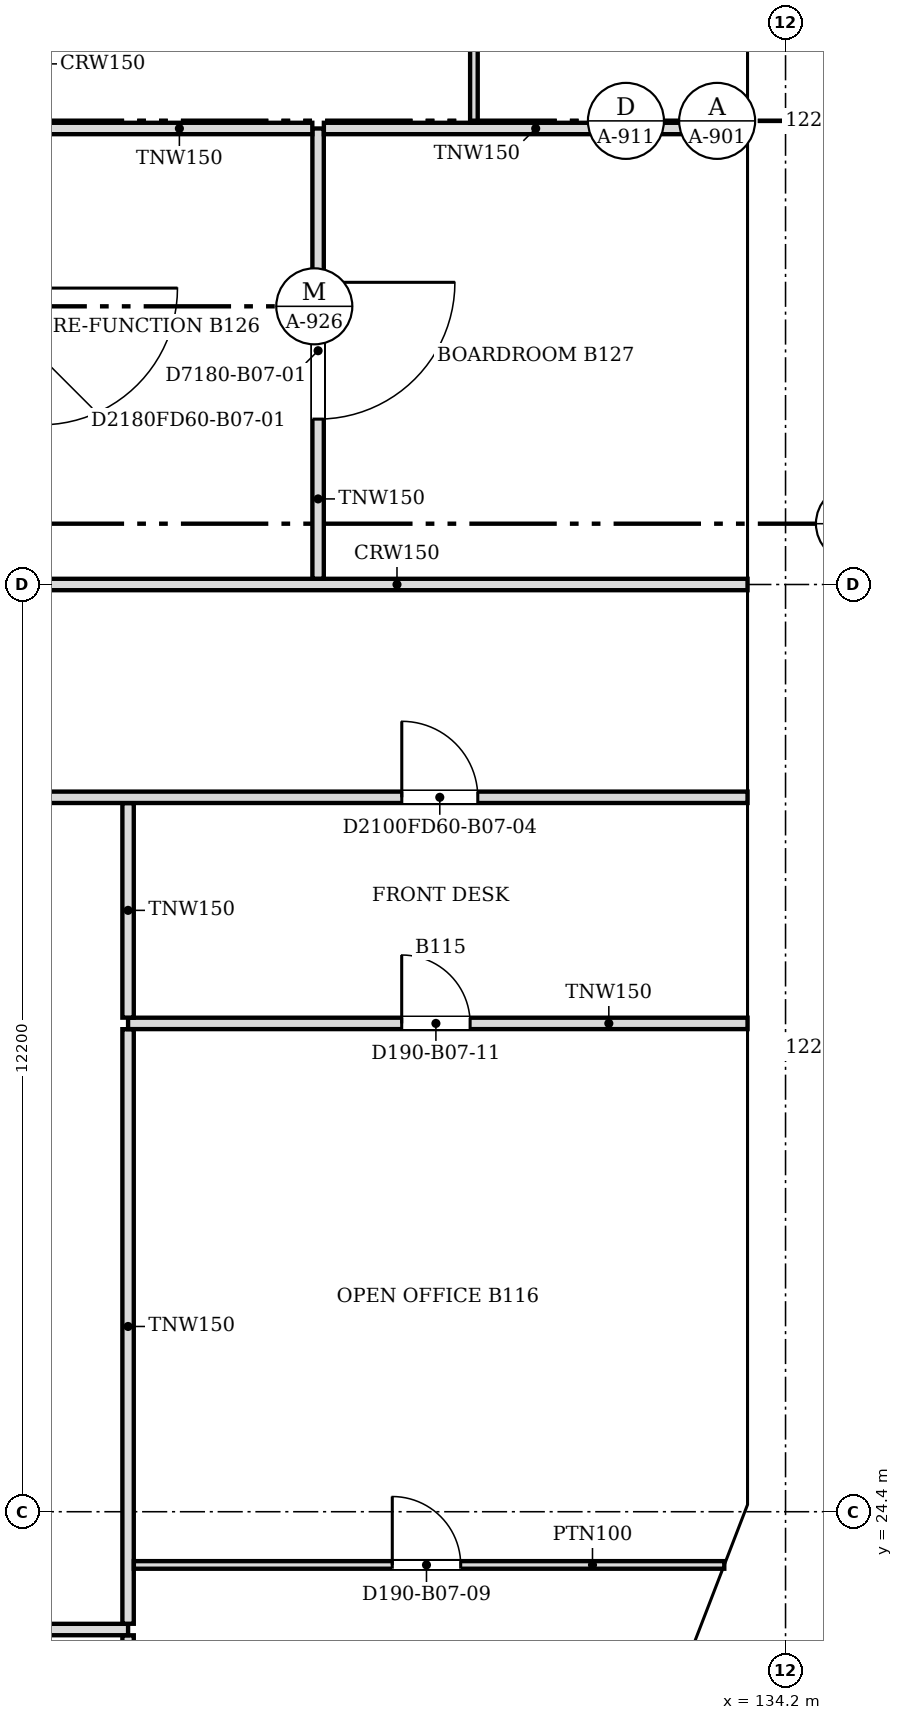
"""IFC4 building model, lengths in metres.
Left out: names, types, materials, properties, quantities, classifications, styles, units other than length and angle.
Written with IfcOpenShell. Run it as: python <this file> out.ifc"""

import sys

from ifc_helpers import new_model, si_unit, direction, frame, frame_2d, origin, place, context, subcontext, project, spatial, polyline, rectangle, outline, extrude, faceted_brep, source, transform, mapped, element, fill, save


model = new_model("IFC4")
c1 = context("Model", 3, precision=1e-05, world=origin(), true_north=direction((0.0, 1.0)))
c2 = subcontext(c1, "Body", "Model", "MODEL_VIEW")
j1 = project(units=[si_unit("LENGTHUNIT", "METRE"), si_unit("PLANEANGLEUNIT", "RADIAN")], contexts=[c1])
p1 = place(None, origin())
s1 = spatial("IfcSite", under=j1, at=p1, CompositionType="ELEMENT")
p2 = place(p1, origin())
s2 = spatial("IfcBuilding", under=s1, at=p2, CompositionType="ELEMENT")
p3 = place(p2, frame((0.0, 0.0, 72.4)))
s3 = spatial("IfcBuildingStorey", under=s2, at=p3, CompositionType="ELEMENT", Elevation=72.4)
m1 = source(origin(), c2, "Body", "Brep", [
    faceted_brep([(2.95, -0.25, 0.0), (2.997, -0.25, 0.059), (2.997, -0.25, 7.541), (2.95, -0.25, 7.6), (0.0, -0.25, 3.8), (0.053, 0.25, 3.868), (2.904, 0.25, 7.54), (2.904, 0.25, 0.06), (0.053, 0.25, 3.732), (2.95, 0.0, 0.0), (2.95, 0.0, 7.6), (0.0, 0.0, 3.8)], [[[0, 1, 2, 3, 4]], [[5, 6, 7, 8]], [[1, 0, 9]], [[10, 3, 2]], [[6, 5, 11, 4, 3, 10]], [[8, 7, 9, 0, 4, 11]], [[8, 11, 5]], [[1, 9, 7, 6, 10, 2]]]),
])
p4 = place(p3, frame((132.888, 21.694, -3.8), z_axis=(0.0, 0.0, 1.0), x_axis=(0.359901446078, 0.932990326376, 0.0)))
e1 = element("IfcWall", 1, at=p4, inside=s3, PredefinedType="SOLIDWALL", context=c2, shape_type="MappedRepresentation", body=[
    mapped(m1, transform((0.0, 0.0, 0.0), scale=1.0)),
])
m2 = source(origin(), c2, "Body", "SweptSolid", [
    extrude(outline(polyline([(2.75, 6.935), (0.316, 3.8), (2.75, 0.665), (2.75, 6.935)])), frame((0.0, 0.26, 0.0), z_axis=(0.0, -1.0, 0.0), x_axis=(1.0, 0.0, 0.0)), (0.0, 0.0, 1.0), 0.52),
])
p5 = place(p4, origin())
e2 = element("IfcOpeningElement", 2, at=p5, cuts=e1, PredefinedType="OPENING", context=c2, shape_type="MappedRepresentation", body=[
    mapped(m2, transform((0.0, 0.0, 0.0), scale=1.0)),
])
m3 = source(origin(), c2, "Body", "Brep", [
    faceted_brep([(0.047, -0.25, 0.0), (3.05, -0.25, 3.8), (0.047, -0.25, 7.6), (0.0, -0.25, 7.54), (0.0, -0.25, 0.06), (0.093, 0.25, 7.541), (3.05, 0.25, 3.8), (0.093, 0.25, 0.059), (0.047, 0.0, 0.0), (0.047, 0.0, 7.6)], [[[0, 1, 2, 3, 4]], [[5, 6, 7]], [[7, 6, 1, 0, 8]], [[6, 5, 9, 2, 1]], [[3, 2, 9]], [[8, 0, 4]], [[7, 8, 4, 3, 9, 5]]]),
])
p6 = place(p3, frame((133.95, 24.4, -3.8), z_axis=(0.0, 0.0, 1.0), x_axis=(0.0, 1.0, 0.0)))
e3 = element("IfcWall", 3, at=p6, inside=s3, PredefinedType="SOLIDWALL", context=c2, shape_type="MappedRepresentation", body=[
    mapped(m3, transform((0.0, 0.0, 0.0), scale=1.0)),
])
m4 = source(origin(), c2, "Body", "SweptSolid", [
    extrude(outline(polyline([(0.247, 0.656), (2.731, 3.8), (0.247, 6.944), (0.247, 0.656)])), frame((0.0, 0.26, 0.0), z_axis=(0.0, -1.0, 0.0), x_axis=(1.0, 0.0, 0.0)), (0.0, 0.0, 1.0), 0.52),
])
p7 = place(p6, origin())
e4 = element("IfcOpeningElement", 4, at=p7, cuts=e3, PredefinedType="OPENING", context=c2, shape_type="MappedRepresentation", body=[
    mapped(m4, transform((0.0, 0.0, 0.0), scale=1.0)),
])
m5 = source(origin(), c2, "Body", "SweptSolid", [
    extrude(outline(polyline([(3.05, 0.0), (6.1, 3.8), (3.05, 7.6), (0.0, 3.8), (3.05, 0.0)])), frame((0.0, 0.25, 0.0), z_axis=(0.0, -1.0, 0.0), x_axis=(1.0, 0.0, 0.0)), (0.0, 0.0, 1.0), 0.5),
])
p8 = place(p3, frame((133.95, 27.45, -3.8), z_axis=(0.0, 0.0, 1.0), x_axis=(0.0, 1.0, 0.0)))
e5 = element("IfcWall", 5, at=p8, inside=s3, PredefinedType="SOLIDWALL", context=c2, shape_type="MappedRepresentation", body=[
    mapped(m5, transform((0.0, 0.0, 0.0), scale=1.0)),
])
m6 = source(origin(), c2, "Body", "SweptSolid", [
    extrude(outline(polyline([(3.05, 0.399), (5.78, 3.8), (3.05, 7.2), (0.321, 3.8), (3.05, 0.399)])), frame((0.0, 0.26, 0.0), z_axis=(0.0, -1.0, 0.0), x_axis=(1.0, 0.0, 0.0)), (0.0, 0.0, 1.0), 0.52),
])
p9 = place(p8, origin())
e6 = element("IfcOpeningElement", 6, at=p9, cuts=e5, PredefinedType="OPENING", context=c2, shape_type="MappedRepresentation", body=[
    mapped(m6, transform((0.0, 0.0, 0.0), scale=1.0)),
])
m7 = source(origin(), c2, "Body", "Brep", [
    faceted_brep([(3.05, -0.25, 0.0), (6.1, -0.25, 3.8), (6.1, -0.25, 3.8), (3.05, -0.25, 7.6), (0.0, -0.25, 3.8), (0.0, 0.25, 3.8), (3.05, 0.25, 7.6), (6.1, 0.25, 3.8), (6.1, 0.25, 3.8), (3.05, 0.25, 0.0)], [[[0, 1, 2, 3, 4]], [[5, 6, 7, 8, 9]], [[9, 8, 1, 0]], [[7, 6, 3, 2]], [[6, 5, 4, 3]], [[5, 9, 0, 4]], [[1, 8, 7, 2]]]),
])
p10 = place(p3, frame((133.95, 33.55, -3.8), z_axis=(0.0, 0.0, 1.0), x_axis=(0.0, 1.0, 0.0)))
e7 = element("IfcWall", 7, at=p10, inside=s3, PredefinedType="SOLIDWALL", context=c2, shape_type="MappedRepresentation", body=[
    mapped(m7, transform((0.0, 0.0, 0.0), scale=1.0)),
])
p11 = place(p10, origin())
e8 = element("IfcOpeningElement", 8, at=p11, cuts=e7, PredefinedType="OPENING", context=c2, shape_type="MappedRepresentation", body=[
    mapped(m6, transform((0.0, 0.0, 0.0), scale=1.0)),
])
p12 = place(p3, frame((133.95, 39.65, -3.8), z_axis=(0.0, 0.0, 1.0), x_axis=(0.0, 1.0, 0.0)))
e9 = element("IfcWall", 9, at=p12, inside=s3, PredefinedType="SOLIDWALL", context=c2, shape_type="MappedRepresentation", body=[
    mapped(m5, transform((0.0, 0.0, 0.0), scale=1.0)),
])
p13 = place(p12, origin())
e10 = element("IfcOpeningElement", 10, at=p13, cuts=e9, PredefinedType="OPENING", context=c2, shape_type="MappedRepresentation", body=[
    mapped(m6, transform((0.0, 0.0, 0.0), scale=1.0)),
])
p14 = place(p2, frame((0.0, 0.0, 76.2)))
s4 = spatial("IfcBuildingStorey", under=s2, at=p14, CompositionType="ELEMENT", Elevation=76.2)
m8 = source(origin(), c2, "Body", "Brep", [
    faceted_brep([(0.053, -0.25, 0.0), (3.003, -0.25, 3.8), (0.053, -0.25, 7.6), (0.0, -0.25, 7.532), (0.0, -0.25, 0.068), (0.106, 0.25, 7.532), (2.957, 0.25, 3.86), (2.957, 0.25, 3.74), (0.106, 0.25, 0.068), (3.003, 0.0, 3.8), (0.053, 0.0, 0.0), (0.053, 0.0, 7.6)], [[[0, 1, 2, 3, 4]], [[5, 6, 7, 8]], [[8, 7, 9, 1, 0, 10]], [[6, 5, 11, 2, 1, 9]], [[3, 2, 11]], [[10, 0, 4]], [[8, 10, 4, 3, 11, 5]], [[9, 7, 6]]]),
])
p15 = place(p14, frame((132.869, 21.644, -3.8), z_axis=(0.0, 0.0, 1.0), x_axis=(0.359855894603, 0.933007896601, 0.0)))
e11 = element("IfcWall", 11, at=p15, inside=s4, PredefinedType="SOLIDWALL", context=c2, shape_type="MappedRepresentation", body=[
    mapped(m8, transform((0.0, 0.0, 0.0), scale=1.0)),
])
m9 = source(origin(), c2, "Body", "SweptSolid", [
    extrude(outline(polyline([(0.253, 0.665), (2.687, 3.8), (0.253, 6.935), (0.253, 0.665)])), frame((0.0, 0.26, 0.0), z_axis=(0.0, -1.0, 0.0), x_axis=(1.0, 0.0, 0.0)), (0.0, 0.0, 1.0), 0.52),
])
p16 = place(p15, origin())
e12 = element("IfcOpeningElement", 12, at=p16, cuts=e11, PredefinedType="OPENING", context=c2, shape_type="MappedRepresentation", body=[
    mapped(m9, transform((0.0, 0.0, 0.0), scale=1.0)),
])
m10 = source(origin(), c2, "Body", "Brep", [
    faceted_brep([(3.003, -0.25, 0.0), (6.053, -0.25, 3.8), (3.003, -0.25, 7.6), (0.0, -0.25, 3.8), (0.047, 0.25, 3.859), (3.003, 0.25, 7.6), (6.053, 0.25, 3.8), (3.003, 0.25, 0.0), (0.047, 0.25, 3.741), (0.0, 0.0, 3.8)], [[[0, 1, 2, 3]], [[4, 5, 6, 7, 8]], [[7, 6, 1, 0]], [[6, 5, 2, 1]], [[5, 4, 9, 3, 2]], [[8, 7, 0, 3, 9]], [[8, 9, 4]]]),
])
p17 = place(p14, frame((133.95, 24.447, -3.8), z_axis=(0.0, 0.0, 1.0), x_axis=(0.0, 1.0, 0.0)))
e13 = element("IfcWall", 13, at=p17, inside=s4, PredefinedType="SOLIDWALL", context=c2, shape_type="MappedRepresentation", body=[
    mapped(m10, transform((0.0, 0.0, 0.0), scale=1.0)),
])
m11 = source(origin(), c2, "Body", "SweptSolid", [
    extrude(outline(polyline([(3.005, 0.401), (5.733, 3.8), (3.005, 7.199), (0.319, 3.8), (3.005, 0.401)])), frame((0.0, 0.26, 0.0), z_axis=(0.0, -1.0, 0.0), x_axis=(1.0, 0.0, 0.0)), (0.0, 0.0, 1.0), 0.52),
])
p18 = place(p17, origin())
e14 = element("IfcOpeningElement", 14, at=p18, cuts=e13, PredefinedType="OPENING", context=c2, shape_type="MappedRepresentation", body=[
    mapped(m11, transform((0.0, 0.0, 0.0), scale=1.0)),
])
m12 = source(origin(), c2, "Body", "SweptSolid", [
    extrude(outline(polyline([(3.05, 0.0), (6.1, 3.8), (3.05, 7.6), (0.0, 3.8), (3.05, 0.0)])), frame((0.0, 0.25, 0.0), z_axis=(0.0, -1.0, 0.0), x_axis=(1.0, 0.0, 0.0)), (0.0, 0.0, 1.0), 0.5),
])
p19 = place(p14, frame((133.95, 30.5, -3.8), z_axis=(0.0, 0.0, 1.0), x_axis=(0.0, 1.0, 0.0)))
e15 = element("IfcWall", 15, at=p19, inside=s4, PredefinedType="SOLIDWALL", context=c2, shape_type="MappedRepresentation", body=[
    mapped(m12, transform((0.0, 0.0, 0.0), scale=1.0)),
])
m13 = source(origin(), c2, "Body", "SweptSolid", [
    extrude(outline(polyline([(3.05, 0.399), (5.78, 3.8), (3.05, 7.201), (0.321, 3.8), (3.05, 0.399)])), frame((0.0, 0.26, 0.0), z_axis=(0.0, -1.0, 0.0), x_axis=(1.0, 0.0, 0.0)), (0.0, 0.0, 1.0), 0.52),
])
p20 = place(p19, origin())
e16 = element("IfcOpeningElement", 16, at=p20, cuts=e15, PredefinedType="OPENING", context=c2, shape_type="MappedRepresentation", body=[
    mapped(m13, transform((0.0, 0.0, 0.0), scale=1.0)),
])
m14 = source(origin(), c2, "Body", "Brep", [
    faceted_brep([(3.05, -0.25, 0.0), (6.1, -0.25, 3.8), (6.1, -0.25, 3.8), (3.05, -0.25, 7.6), (0.0, -0.25, 3.8), (0.0, 0.25, 3.8), (3.05, 0.25, 7.6), (6.1, 0.25, 3.8), (6.1, 0.25, 3.8), (3.05, 0.25, 0.0)], [[[0, 1, 2, 3, 4]], [[5, 6, 7, 8, 9]], [[9, 8, 1, 0]], [[7, 6, 3, 2]], [[6, 5, 4, 3]], [[5, 9, 0, 4]], [[1, 8, 7, 2]]]),
])
p21 = place(p14, frame((133.95, 36.6, -3.8), z_axis=(0.0, 0.0, 1.0), x_axis=(0.0, 1.0, 0.0)))
e17 = element("IfcWall", 17, at=p21, inside=s4, PredefinedType="SOLIDWALL", context=c2, shape_type="MappedRepresentation", body=[
    mapped(m14, transform((0.0, 0.0, 0.0), scale=1.0)),
])
p22 = place(p21, origin())
e18 = element("IfcOpeningElement", 18, at=p22, cuts=e17, PredefinedType="OPENING", context=c2, shape_type="MappedRepresentation", body=[
    mapped(m13, transform((0.0, 0.0, 0.0), scale=1.0)),
])
m15 = source(origin(), c2, "Body", "Brep", [
    faceted_brep([(3.05, -0.25, 0.0), (6.053, -0.25, 3.8), (3.05, -0.25, 7.6), (0.0, -0.25, 3.8), (0.0, 0.25, 3.8), (3.05, 0.25, 7.6), (6.007, 0.25, 3.859), (6.007, 0.25, 3.741), (3.05, 0.25, 0.0), (6.053, 0.0, 3.8)], [[[0, 1, 2, 3]], [[4, 5, 6, 7, 8]], [[8, 7, 9, 1, 0]], [[6, 5, 2, 1, 9]], [[5, 4, 3, 2]], [[4, 8, 0, 3]], [[9, 7, 6]]]),
])
p23 = place(p14, frame((133.95, 42.7, -3.8), z_axis=(0.0, 0.0, 1.0), x_axis=(0.0, 1.0, 0.0)))
e19 = element("IfcWall", 19, at=p23, inside=s4, PredefinedType="SOLIDWALL", context=c2, shape_type="MappedRepresentation", body=[
    mapped(m15, transform((0.0, 0.0, 0.0), scale=1.0)),
])
m16 = source(origin(), c2, "Body", "SweptSolid", [
    extrude(outline(polyline([(3.049, 0.401), (5.735, 3.8), (3.049, 7.199), (0.321, 3.8), (3.049, 0.401)])), frame((0.0, 0.26, 0.0), z_axis=(0.0, -1.0, 0.0), x_axis=(1.0, 0.0, 0.0)), (0.0, 0.0, 1.0), 0.52),
])
p24 = place(p23, origin())
e20 = element("IfcOpeningElement", 20, at=p24, cuts=e19, PredefinedType="OPENING", context=c2, shape_type="MappedRepresentation", body=[
    mapped(m16, transform((0.0, 0.0, 0.0), scale=1.0)),
])
p25 = place(p3, frame((125.55, 18.8, 0.0), z_axis=(0.0, 0.0, 1.0), x_axis=(0.0, 1.0, 0.0)))
e21 = element("IfcWall", 21, at=p25, inside=s3, PredefinedType="PARTITIONING", context=c2, shape_type="SweptSolid", body=[
    extrude(rectangle(XDim=3.974, YDim=0.15, at=frame_2d((1.987, 0.0))), origin(), (0.0, 0.0, 1.0), 3.067),
])
p26 = place(p3, frame((125.55, 22.85, 0.0), z_axis=(0.0, 0.0, 1.0), x_axis=(-1.0, 0.0, 0.0)))
e22 = element("IfcWall", 22, at=p26, inside=s3, PredefinedType="PARTITIONING", context=c2, shape_type="SweptSolid", body=[
    extrude(rectangle(XDim=9.15, YDim=0.15, at=frame_2d((4.575, 0.0))), origin(), (0.0, 0.0, 1.0), 3.067),
])
m17 = source(origin(), c2, "Body", "SweptSolid", [
    extrude(rectangle(XDim=0.9, YDim=2.1, at=frame_2d((0.45, 1.05))), frame((0.0, 0.085, 0.0), z_axis=(0.0, -1.0, 0.0), x_axis=(1.0, 0.0, 0.0)), (0.0, 0.0, 1.0), 0.17),
])
p27 = place(p26, frame((6.45, 0.0, 0.0)))
e23 = element("IfcOpeningElement", 23, at=p27, cuts=e22, PredefinedType="OPENING", context=c2, shape_type="MappedRepresentation", body=[
    mapped(m17, transform((0.0, 0.0, 0.0), scale=1.0)),
])
p28 = place(p26, frame((1.93, 0.0, 0.0)))
e24 = element("IfcOpeningElement", 24, at=p28, cuts=e22, PredefinedType="OPENING", context=c2, shape_type="MappedRepresentation", body=[
    mapped(m17, transform((0.0, 0.0, 0.0), scale=1.0)),
])
p29 = place(p3, frame((125.55, 22.926, 0.0), z_axis=(0.0, 0.0, 1.0), x_axis=(0.0, 1.0, 0.0)))
e25 = element("IfcWall", 25, at=p29, inside=s3, PredefinedType="PARTITIONING", context=c2, shape_type="SweptSolid", body=[
    extrude(rectangle(XDim=7.823, YDim=0.15, at=frame_2d((3.912, 0.0))), origin(), (0.0, 0.0, 1.0), 3.067),
])
p30 = place(p3, frame((133.394, 23.7, 0.0), z_axis=(0.0, 0.0, 1.0), x_axis=(-1.0, 0.0, 0.0)))
e26 = element("IfcWall", 26, at=p30, inside=s3, PredefinedType="PARTITIONING", context=c2, shape_type="SweptSolid", body=[
    extrude(rectangle(XDim=7.768, YDim=0.1, at=frame_2d((3.884, 0.0))), origin(), (0.0, 0.0, 1.0), 3.067),
])
m18 = source(origin(), c2, "Body", "SweptSolid", [
    extrude(rectangle(XDim=0.9, YDim=2.1, at=frame_2d((0.45, 1.05))), frame((0.0, 0.06, 0.0), z_axis=(0.0, -1.0, 0.0), x_axis=(1.0, 0.0, 0.0)), (0.0, 0.0, 1.0), 0.12),
])
p31 = place(p30, frame((3.468, 0.0, 0.0)))
e27 = element("IfcOpeningElement", 27, at=p31, cuts=e26, PredefinedType="OPENING", context=c2, shape_type="MappedRepresentation", body=[
    mapped(m18, transform((0.0, 0.0, 0.0), scale=1.0)),
])
p32 = place(p3, frame((133.7, 30.825, 0.0), z_axis=(0.0, 0.0, 1.0), x_axis=(-1.0, 0.0, 0.0)))
e28 = element("IfcWall", 28, at=p32, inside=s3, PredefinedType="PARTITIONING", context=c2, shape_type="SweptSolid", body=[
    extrude(rectangle(XDim=8.15, YDim=0.15, at=frame_2d((4.075, 0.0))), origin(), (0.0, 0.0, 1.0), 3.067),
])
p33 = place(p32, frame((3.65, 0.0, 0.0)))
e29 = element("IfcOpeningElement", 29, at=p33, cuts=e28, PredefinedType="OPENING", context=c2, shape_type="MappedRepresentation", body=[
    mapped(m17, transform((0.0, 0.0, 0.0), scale=1.0)),
])
p34 = place(p3, frame((125.55, 30.901, 0.0), z_axis=(0.0, 0.0, 1.0), x_axis=(0.0, 1.0, 0.0)))
e30 = element("IfcWall", 30, at=p34, inside=s3, PredefinedType="PARTITIONING", context=c2, shape_type="SweptSolid", body=[
    extrude(rectangle(XDim=2.823, YDim=0.15, at=frame_2d((1.412, 0.0))), origin(), (0.0, 0.0, 1.0), 3.067),
])
p35 = place(p3, frame((133.7, 33.8, 0.0), z_axis=(0.0, 0.0, 1.0), x_axis=(-1.0, 0.0, 0.0)))
e31 = element("IfcWall", 31, at=p35, inside=s3, PredefinedType="PARTITIONING", context=c2, shape_type="SweptSolid", body=[
    extrude(rectangle(XDim=47.8, YDim=0.15, at=frame_2d((23.9, 0.0))), origin(), (0.0, 0.0, 1.0), 3.067),
])
m19 = source(origin(), c2, "Body", "SweptSolid", [
    extrude(rectangle(XDim=1.0, YDim=2.1, at=frame_2d((0.5, 1.05))), frame((0.0, 0.085, 0.0), z_axis=(0.0, -1.0, 0.0), x_axis=(1.0, 0.0, 0.0)), (0.0, 0.0, 1.0), 0.17),
])
p36 = place(p35, frame((3.549, 0.0, 0.0)))
e32 = element("IfcOpeningElement", 32, at=p36, cuts=e31, PredefinedType="OPENING", context=c2, shape_type="MappedRepresentation", body=[
    mapped(m19, transform((0.0, 0.0, 0.0), scale=1.0)),
])
p37 = place(p35, frame((42.7, 0.0, 0.0)))
e33 = element("IfcOpeningElement", 33, at=p37, cuts=e31, PredefinedType="OPENING", context=c2, shape_type="MappedRepresentation", body=[
    mapped(m19, transform((0.0, 0.0, 0.0), scale=1.0)),
])
p38 = place(p35, frame((12.199, 0.0, 0.0)))
e34 = element("IfcOpeningElement", 34, at=p38, cuts=e31, PredefinedType="OPENING", context=c2, shape_type="MappedRepresentation", body=[
    mapped(m19, transform((0.0, 0.0, 0.0), scale=1.0)),
])
p39 = place(p35, frame((21.349, 0.0, 0.0)))
e35 = element("IfcOpeningElement", 35, at=p39, cuts=e31, PredefinedType="OPENING", context=c2, shape_type="MappedRepresentation", body=[
    mapped(m19, transform((0.0, 0.0, 0.0), scale=1.0)),
])
p40 = place(p35, frame((32.05, 0.0, 0.0)))
e36 = element("IfcOpeningElement", 36, at=p40, cuts=e31, PredefinedType="OPENING", context=c2, shape_type="MappedRepresentation", body=[
    mapped(m19, transform((0.0, 0.0, 0.0), scale=1.0)),
])
p41 = place(p3, frame((124.476, 36.6, 0.0), z_axis=(0.0, 0.0, 1.0), x_axis=(1.0, 0.0, 0.0)))
e37 = element("IfcWall", 37, at=p41, inside=s3, PredefinedType="PARTITIONING", context=c2, shape_type="SweptSolid", body=[
    extrude(rectangle(XDim=9.224, YDim=0.15, at=frame_2d((4.612, 0.0))), origin(), (0.0, 0.0, 1.0), 3.067),
])
p42 = place(p3, frame((128.05, 42.6, 0.0), z_axis=(0.0, 0.0, 1.0), x_axis=(0.0, -1.0, 0.0)))
e38 = element("IfcWall", 38, at=p42, inside=s3, PredefinedType="PARTITIONING", context=c2, shape_type="SweptSolid", body=[
    extrude(rectangle(XDim=5.924, YDim=0.15, at=frame_2d((2.962, 0.0))), origin(), (0.0, 0.0, 1.0), 3.067),
])
m20 = source(origin(), c2, "Body", "SweptSolid", [
    extrude(rectangle(XDim=1.8, YDim=2.1, at=frame_2d((0.9, 1.05))), frame((0.0, 0.085, 0.0), z_axis=(0.0, -1.0, 0.0), x_axis=(1.0, 0.0, 0.0)), (0.0, 0.0, 1.0), 0.17),
])
p43 = place(p42, frame((2.024, 0.0, 0.0)))
e39 = element("IfcOpeningElement", 39, at=p43, cuts=e38, PredefinedType="OPENING", context=c2, shape_type="MappedRepresentation", body=[
    mapped(m20, transform((0.0, 0.0, 0.0), scale=1.0)),
])
p44 = place(p3, frame((124.476, 42.6, 0.0), z_axis=(0.0, 0.0, 1.0), x_axis=(1.0, 0.0, 0.0)))
e40 = element("IfcWall", 40, at=p44, inside=s3, PredefinedType="PARTITIONING", context=c2, shape_type="SweptSolid", body=[
    extrude(rectangle(XDim=3.498, YDim=0.15, at=frame_2d((1.749, 0.0))), origin(), (0.0, 0.0, 1.0), 3.067),
])
p45 = place(p3, frame((128.126, 42.6, 0.0), z_axis=(0.0, 0.0, 1.0), x_axis=(1.0, 0.0, 0.0)))
e41 = element("IfcWall", 41, at=p45, inside=s3, PredefinedType="PARTITIONING", context=c2, shape_type="SweptSolid", body=[
    extrude(rectangle(XDim=5.574, YDim=0.15, at=frame_2d((2.787, 0.0))), origin(), (0.0, 0.0, 1.0), 3.067),
])
p46 = place(p3, frame((130.1, 51.2, 0.0), z_axis=(0.0, 0.0, 1.0), x_axis=(0.0, -1.0, 0.0)))
e42 = element("IfcWall", 42, at=p46, inside=s3, PredefinedType="PARTITIONING", context=c2, shape_type="SweptSolid", body=[
    extrude(rectangle(XDim=8.524, YDim=0.1, at=frame_2d((4.262, 0.0))), origin(), (0.0, 0.0, 1.0), 3.067),
])
p47 = place(p46, frame((3.824, 0.0, 0.0)))
e43 = element("IfcOpeningElement", 43, at=p47, cuts=e42, PredefinedType="OPENING", context=c2, shape_type="MappedRepresentation", body=[
    mapped(m18, transform((0.0, 0.0, 0.0), scale=1.0)),
])
m21 = source(origin(), c2, "Body", "SweptSolid", [
    extrude(rectangle(XDim=1.8, YDim=2.1, at=frame_2d((0.9, 1.05))), frame((0.0, 0.025, 0.0), z_axis=(0.0, -1.0, 0.0), x_axis=(1.0, 0.0, 0.0)), (0.0, 0.0, 1.0), 0.05),
])
p48 = place(p43, origin())
e44 = element("IfcDoor", 44, at=p48, inside=s3, OperationType="DOUBLE_DOOR_SINGLE_SWING", PredefinedType="DOOR", context=c2, shape_type="MappedRepresentation", body=[
    mapped(m21, transform((0.0, 0.0, 0.0), scale=1.0)),
])
fill(e39, e44)
m22 = source(origin(), c2, "Body", "SweptSolid", [
    extrude(rectangle(XDim=0.9, YDim=2.1, at=frame_2d((0.45, 1.05))), frame((0.0, 0.025, 0.0), z_axis=(0.0, -1.0, 0.0), x_axis=(1.0, 0.0, 0.0)), (0.0, 0.0, 1.0), 0.05),
])
p49 = place(p31, origin())
e45 = element("IfcDoor", 45, at=p49, inside=s3, OperationType="SINGLE_SWING_RIGHT", PredefinedType="DOOR", context=c2, shape_type="MappedRepresentation", body=[
    mapped(m22, transform((0.0, 0.0, 0.0), scale=1.0)),
])
fill(e27, e45)
m23 = source(origin(), c2, "Body", "SweptSolid", [
    extrude(rectangle(XDim=1.0, YDim=2.1, at=frame_2d((0.5, 1.05))), frame((0.0, 0.025, 0.0), z_axis=(0.0, -1.0, 0.0), x_axis=(1.0, 0.0, 0.0)), (0.0, 0.0, 1.0), 0.05),
])
p50 = place(p36, origin())
e46 = element("IfcDoor", 46, at=p50, inside=s3, OperationType="SINGLE_SWING_RIGHT", PredefinedType="DOOR", context=c2, shape_type="MappedRepresentation", body=[
    mapped(m23, transform((0.0, 0.0, 0.0), scale=1.0)),
])
fill(e32, e46)
p51 = place(p33, origin())
e47 = element("IfcDoor", 47, at=p51, inside=s3, OperationType="SINGLE_SWING_RIGHT", PredefinedType="DOOR", context=c2, shape_type="MappedRepresentation", body=[
    mapped(m22, transform((0.0, 0.0, 0.0), scale=1.0)),
])
fill(e29, e47)
save(model, sys.argv[1])
